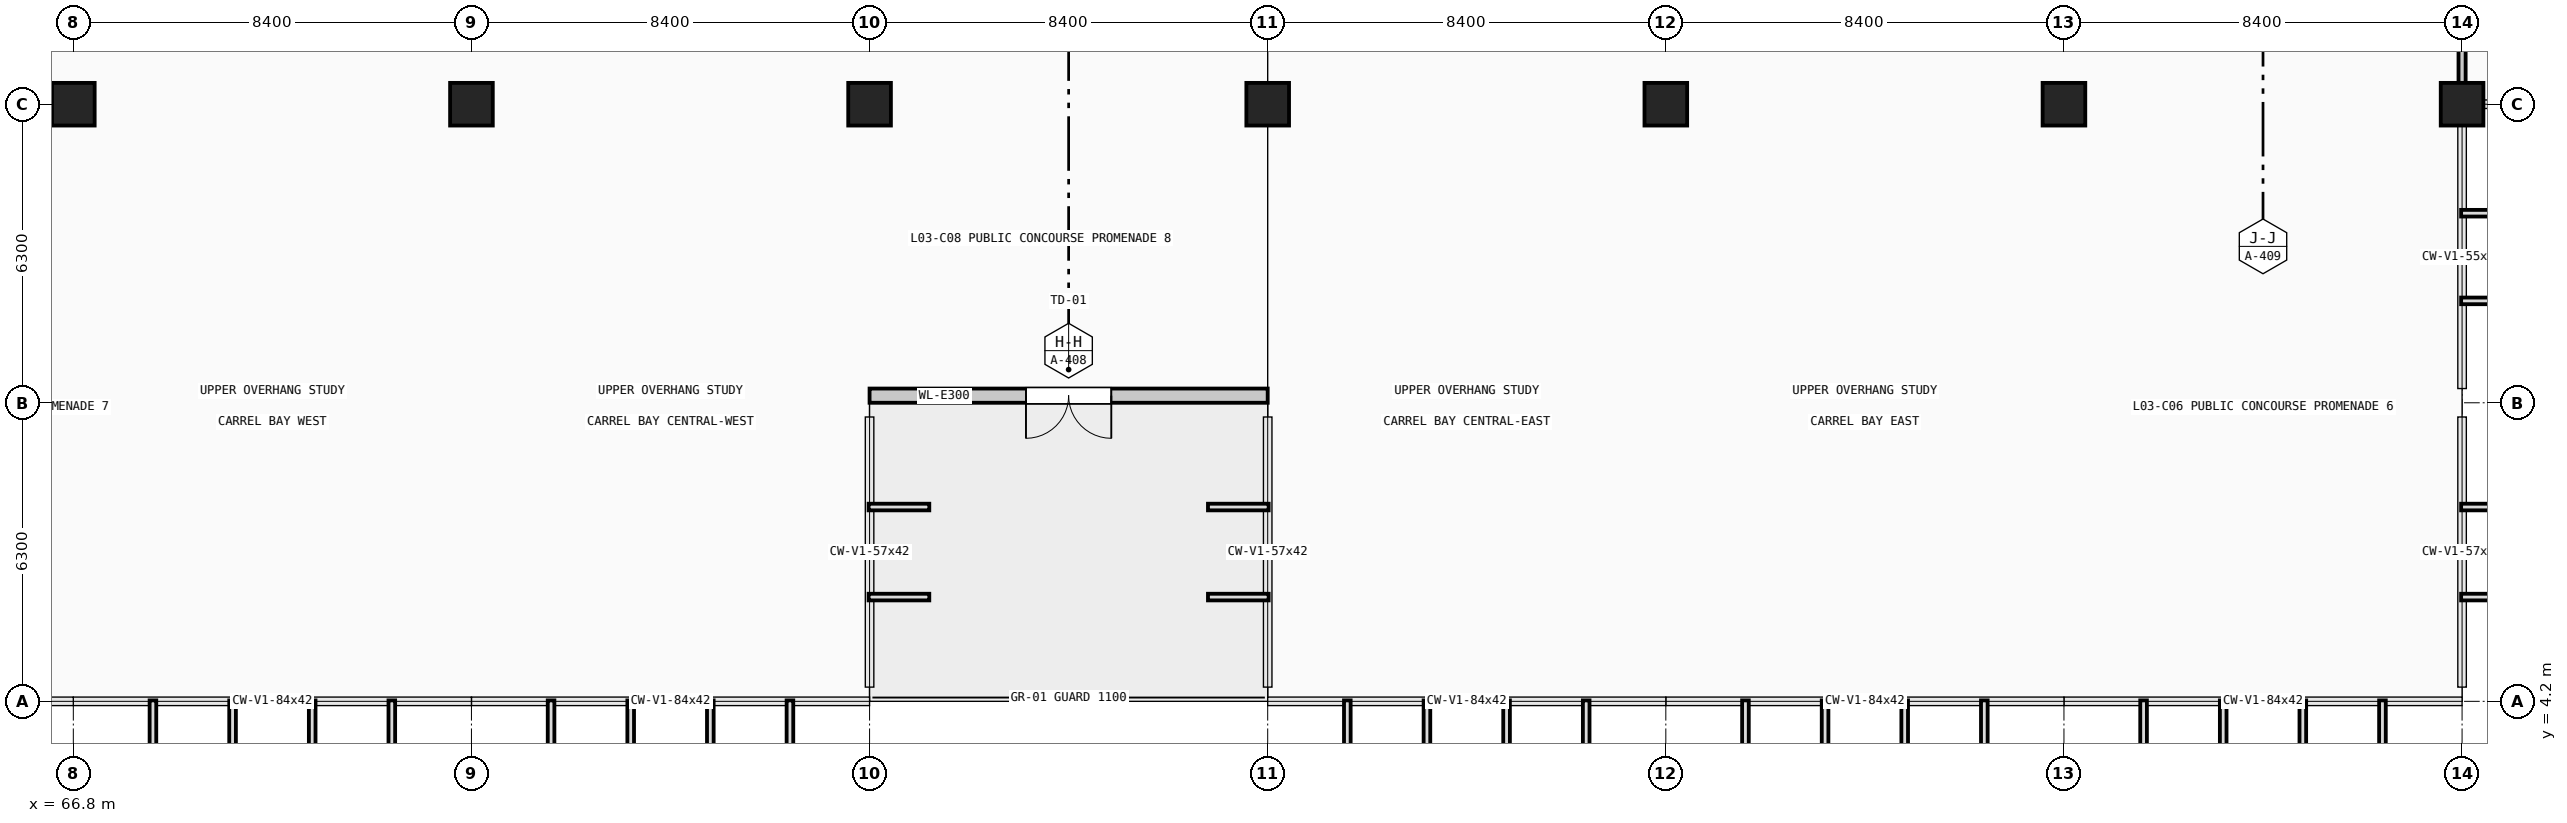
"""IFC4 building model, lengths in metres.
Left out: names, types, materials, properties, quantities, classifications, styles, units other than length and angle.
Written with IfcOpenShell. Run it as: python <this file> out.ifc"""

import sys

from ifc_helpers import new_model, si_unit, direction, frame, frame_2d, origin, origin_2d, place, context, subcontext, project, spatial, rectangle, extrude, element, fill, save


model = new_model("IFC4")
c1 = context("Model", 3, precision=1e-05, world=origin(), true_north=direction((0.0, 1.0)))
c2 = subcontext(c1, "Body", "Model", "MODEL_VIEW")
j1 = project(units=[si_unit("LENGTHUNIT", "METRE"), si_unit("PLANEANGLEUNIT", "RADIAN")], contexts=[c1])
p1 = place(None, origin())
s1 = spatial("IfcSite", under=j1, at=p1, CompositionType="ELEMENT")
p2 = place(p1, origin())
s2 = spatial("IfcBuilding", under=s1, at=p2, CompositionType="ELEMENT")
p3 = place(p2, frame((0.0, 0.0, 14.4)))
s3 = spatial("IfcBuildingStorey", under=s2, at=p3, CompositionType="ELEMENT", Elevation=14.4)
for number, where, z_axis, x_axis in (
    (1, (66.8, 16.8, 0.0), (0.0, 0.0, 1.0), (1.0, 0.0, 0.0)),
    (2, (75.2, 16.8, 0.0), (0.0, 0.0, 1.0), (1.0, 0.0, 0.0)),
    (3, (83.6, 16.8, 0.0), (0.0, 0.0, 1.0), (1.0, 0.0, 0.0)),
    (4, (92.0, 16.8, 0.0), (0.0, 0.0, 1.0), (1.0, 0.0, 0.0)),
    (5, (100.4, 16.8, 0.0), (0.0, 0.0, 1.0), (1.0, 0.0, 0.0)),
    (6, (108.8, 16.8, 0.0), (0.0, 0.0, 1.0), (1.0, 0.0, 0.0)),
    (7, (117.2, 16.8, 0.0), (0.0, 0.0, 1.0), (1.0, 0.0, 0.0)),
):
    element("IfcColumn", number, at=place(p3, frame(where, z_axis=z_axis, x_axis=x_axis)), inside=s3, PredefinedType="COLUMN", context=c2, shape_type="SweptSolid", body=[
        extrude(rectangle(XDim=0.9, YDim=0.9, at=origin_2d()), origin(), (0.0, 0.0, 1.0), 4.48),
    ])
p4 = place(p3, frame((92.0, 10.65, 0.0), z_axis=(0.0, 0.0, 1.0), x_axis=(-1.0, 0.0, 0.0)))
e8 = element("IfcWall", 8, at=p4, inside=s3, PredefinedType="SOLIDWALL", context=c2, shape_type="SweptSolid", body=[
    extrude(rectangle(XDim=8.4, YDim=0.3, at=frame_2d((4.2, 0.0))), origin(), (0.0, 0.0, 1.0), 3.825),
])
p5 = place(p4, frame((3.3, 0.0, 0.0)))
e9 = element("IfcOpeningElement", 9, at=p5, cuts=e8, PredefinedType="OPENING", context=c2, shape_type="SweptSolid", body=[
    extrude(rectangle(XDim=1.8, YDim=2.25, at=frame_2d((0.9, 1.125))), frame((0.0, 0.16, 0.0), z_axis=(0.0, -1.0, 0.0), x_axis=(1.0, 0.0, 0.0)), (0.0, 0.0, 1.0), 0.32),
])
p6 = place(p3, frame((117.2, 17.25, 0.0), z_axis=(0.0, 0.0, 1.0), x_axis=(0.0, 1.0, 0.0)))
e10 = element("IfcWall", 10, at=p6, inside=s3, PredefinedType="PARTITIONING", context=c2, shape_type="SweptSolid", body=[
    extrude(rectangle(XDim=6.3, YDim=0.15, at=frame_2d((3.15, 0.0))), origin(), (0.0, 0.0, 1.0), 3.28),
])
p7 = place(p5, origin())
e11 = element("IfcDoor", 11, at=p7, inside=s3, OperationType="DOUBLE_DOOR_SINGLE_SWING", PredefinedType="DOOR", context=c2, shape_type="SweptSolid", body=[
    extrude(rectangle(XDim=1.8, YDim=2.25, at=frame_2d((0.9, 1.125))), frame((0.0, 0.025, 0.0), z_axis=(0.0, -1.0, 0.0), x_axis=(1.0, 0.0, 0.0)), (0.0, 0.0, 1.0), 0.05),
])
fill(e9, e11)
save(model, sys.argv[1])
